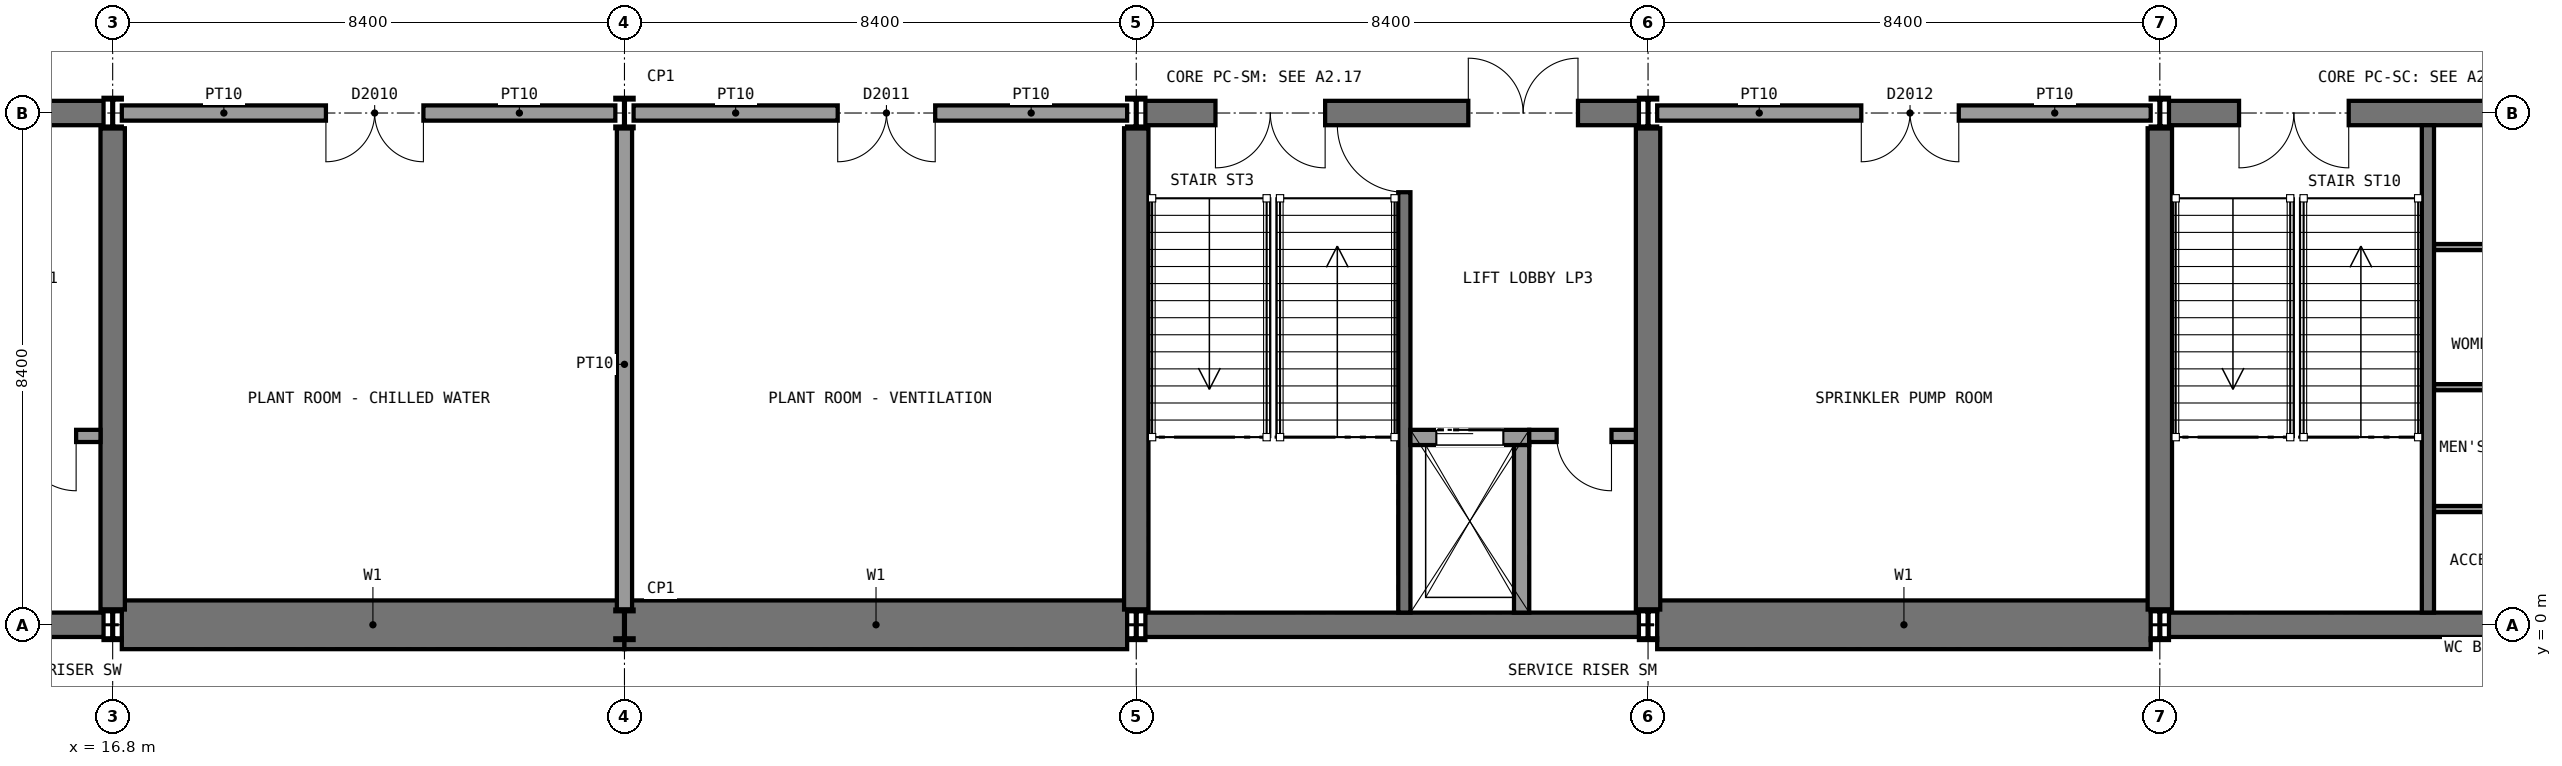
"""IFC4 building model, lengths in metres.
Left out: names, types, materials, properties, quantities, classifications, styles, units other than length and angle.
Written with IfcOpenShell. Run it as: python <this file> out.ifc"""

import sys

from ifc_helpers import new_model, si_unit, direction, frame, frame_2d, origin, origin_2d, place, context, subcontext, project, spatial, rectangle, i_section, extrude, element, fill, save


model = new_model("IFC4")
c1 = context("Model", 3, precision=1e-05, world=origin(), true_north=direction((0.0, 1.0)))
c2 = subcontext(c1, "Body", "Model", "MODEL_VIEW")
j1 = project(units=[si_unit("LENGTHUNIT", "METRE"), si_unit("PLANEANGLEUNIT", "RADIAN")], contexts=[c1])
p1 = place(None, origin())
s1 = spatial("IfcSite", under=j1, at=p1, CompositionType="ELEMENT")
p2 = place(p1, origin())
s2 = spatial("IfcBuilding", under=s1, at=p2, CompositionType="ELEMENT")
p3 = place(p2, frame((0.0, 0.0, -9.9)))
s3 = spatial("IfcBuildingStorey", under=s2, at=p3, CompositionType="ELEMENT", Elevation=-9.9)
p4 = place(p3, frame((16.95, 0.0, 0.0), z_axis=(0.0, 0.0, 1.0), x_axis=(1.0, 0.0, 0.0)))
e1 = element("IfcWall", 1, at=p4, inside=s3, PredefinedType="SOLIDWALL", context=c2, shape_type="SweptSolid", body=[
    extrude(rectangle(XDim=8.25, YDim=0.8, at=frame_2d((4.125, 0.0))), origin(), (0.0, 0.0, 1.0), 4.65),
])
p5 = place(p3, frame((25.2, 0.0, 0.0), z_axis=(0.0, 0.0, 1.0), x_axis=(1.0, 0.0, 0.0)))
e2 = element("IfcWall", 2, at=p5, inside=s3, PredefinedType="SOLIDWALL", context=c2, shape_type="SweptSolid", body=[
    extrude(rectangle(XDim=8.25, YDim=0.8, at=frame_2d((4.125, 0.0))), origin(), (0.0, 0.0, 1.0), 4.65),
])
p6 = place(p3, frame((42.15, 0.0, 0.0), z_axis=(0.0, 0.0, 1.0), x_axis=(1.0, 0.0, 0.0)))
e3 = element("IfcWall", 3, at=p6, inside=s3, PredefinedType="SOLIDWALL", context=c2, shape_type="SweptSolid", body=[
    extrude(rectangle(XDim=8.1, YDim=0.8, at=frame_2d((4.05, 0.0))), origin(), (0.0, 0.0, 1.0), 4.65),
])
p7 = place(p3, frame((8.55, 0.0, 0.0), z_axis=(0.0, 0.0, 1.0), x_axis=(1.0, 0.0, 0.0)))
e4 = element("IfcWall", 4, at=p7, inside=s3, PredefinedType="SHEAR", context=c2, shape_type="SweptSolid", body=[
    extrude(rectangle(XDim=8.1, YDim=0.4, at=frame_2d((4.05, 0.0))), origin(), (0.0, 0.0, 1.0), 4.65),
])
p8 = place(p3, frame((8.55, 8.4, 0.0), z_axis=(0.0, 0.0, 1.0), x_axis=(1.0, 0.0, 0.0)))
e5 = element("IfcWall", 5, at=p8, inside=s3, PredefinedType="SHEAR", context=c2, shape_type="SweptSolid", body=[
    extrude(rectangle(XDim=8.1, YDim=0.4, at=frame_2d((4.05, 0.0))), origin(), (0.0, 0.0, 1.0), 4.65),
])
p9 = place(p8, frame((1.15, 0.0, 0.0)))
e6 = element("IfcOpeningElement", 6, at=p9, cuts=e5, PredefinedType="OPENING", context=c2, shape_type="SweptSolid", body=[
    extrude(rectangle(XDim=1.8, YDim=2.1, at=frame_2d((0.9, 1.05))), frame((0.0, 0.21, 0.0), z_axis=(0.0, -1.0, 0.0), x_axis=(1.0, 0.0, 0.0)), (0.0, 0.0, 1.0), 0.42),
])
p10 = place(p8, frame((5.3, 0.0, 0.0)))
e7 = element("IfcOpeningElement", 7, at=p10, cuts=e5, PredefinedType="OPENING", context=c2, shape_type="SweptSolid", body=[
    extrude(rectangle(XDim=1.8, YDim=2.1, at=frame_2d((0.9, 1.05))), frame((0.0, 0.21, 0.0), z_axis=(0.0, -1.0, 0.0), x_axis=(1.0, 0.0, 0.0)), (0.0, 0.0, 1.0), 0.42),
])
p11 = place(p3, frame((16.8, 0.25, 0.0), z_axis=(0.0, 0.0, 1.0), x_axis=(0.0, 1.0, 0.0)))
e8 = element("IfcWall", 8, at=p11, inside=s3, PredefinedType="SHEAR", context=c2, shape_type="SweptSolid", body=[
    extrude(rectangle(XDim=7.9, YDim=0.4, at=frame_2d((3.95, 0.0))), origin(), (0.0, 0.0, 1.0), 4.65),
])
p12 = place(p3, frame((33.75, 0.0, 0.0), z_axis=(0.0, 0.0, 1.0), x_axis=(1.0, 0.0, 0.0)))
e9 = element("IfcWall", 9, at=p12, inside=s3, PredefinedType="SHEAR", context=c2, shape_type="SweptSolid", body=[
    extrude(rectangle(XDim=8.1, YDim=0.4, at=frame_2d((4.05, 0.0))), origin(), (0.0, 0.0, 1.0), 4.65),
])
p13 = place(p3, frame((33.75, 8.4, 0.0), z_axis=(0.0, 0.0, 1.0), x_axis=(1.0, 0.0, 0.0)))
e10 = element("IfcWall", 10, at=p13, inside=s3, PredefinedType="SHEAR", context=c2, shape_type="SweptSolid", body=[
    extrude(rectangle(XDim=8.1, YDim=0.4, at=frame_2d((4.05, 0.0))), origin(), (0.0, 0.0, 1.0), 4.65),
])
p14 = place(p13, frame((1.15, 0.0, 0.0)))
e11 = element("IfcOpeningElement", 11, at=p14, cuts=e10, PredefinedType="OPENING", context=c2, shape_type="SweptSolid", body=[
    extrude(rectangle(XDim=1.8, YDim=2.1, at=frame_2d((0.9, 1.05))), frame((0.0, 0.21, 0.0), z_axis=(0.0, -1.0, 0.0), x_axis=(1.0, 0.0, 0.0)), (0.0, 0.0, 1.0), 0.42),
])
p15 = place(p13, frame((5.3, 0.0, 0.0)))
e12 = element("IfcOpeningElement", 12, at=p15, cuts=e10, PredefinedType="OPENING", context=c2, shape_type="SweptSolid", body=[
    extrude(rectangle(XDim=1.8, YDim=2.1, at=frame_2d((0.9, 1.05))), frame((0.0, 0.21, 0.0), z_axis=(0.0, -1.0, 0.0), x_axis=(1.0, 0.0, 0.0)), (0.0, 0.0, 1.0), 0.42),
])
for number, where, z_axis, x_axis in (
    (13, (33.6, 0.25, 0.0), (0.0, 0.0, 1.0), (0.0, 1.0, 0.0)),
    (14, (42.0, 0.25, 0.0), (0.0, 0.0, 1.0), (0.0, 1.0, 0.0)),
):
    element("IfcWall", number, at=place(p3, frame(where, z_axis=z_axis, x_axis=x_axis)), inside=s3, PredefinedType="SHEAR", context=c2, shape_type="SweptSolid", body=[
        extrude(rectangle(XDim=7.9, YDim=0.4, at=frame_2d((3.95, 0.0))), origin(), (0.0, 0.0, 1.0), 4.65),
    ])
p16 = place(p3, frame((50.55, 0.0, 0.0), z_axis=(0.0, 0.0, 1.0), x_axis=(1.0, 0.0, 0.0)))
e15 = element("IfcWall", 15, at=p16, inside=s3, PredefinedType="SHEAR", context=c2, shape_type="SweptSolid", body=[
    extrude(rectangle(XDim=8.1, YDim=0.4, at=frame_2d((4.05, 0.0))), origin(), (0.0, 0.0, 1.0), 4.65),
])
p17 = place(p3, frame((50.55, 8.4, 0.0), z_axis=(0.0, 0.0, 1.0), x_axis=(1.0, 0.0, 0.0)))
e16 = element("IfcWall", 16, at=p17, inside=s3, PredefinedType="SHEAR", context=c2, shape_type="SweptSolid", body=[
    extrude(rectangle(XDim=8.1, YDim=0.4, at=frame_2d((4.05, 0.0))), origin(), (0.0, 0.0, 1.0), 4.65),
])
p18 = place(p17, frame((1.15, 0.0, 0.0)))
e17 = element("IfcOpeningElement", 17, at=p18, cuts=e16, PredefinedType="OPENING", context=c2, shape_type="SweptSolid", body=[
    extrude(rectangle(XDim=1.8, YDim=2.1, at=frame_2d((0.9, 1.05))), frame((0.0, 0.21, 0.0), z_axis=(0.0, -1.0, 0.0), x_axis=(1.0, 0.0, 0.0)), (0.0, 0.0, 1.0), 0.42),
])
p19 = place(p17, frame((5.6, 0.0, 0.0)))
e18 = element("IfcOpeningElement", 18, at=p19, cuts=e16, PredefinedType="OPENING", context=c2, shape_type="SweptSolid", body=[
    extrude(rectangle(XDim=1.2, YDim=2.1, at=frame_2d((0.6, 1.05))), frame((0.0, 0.21, 0.0), z_axis=(0.0, -1.0, 0.0), x_axis=(1.0, 0.0, 0.0)), (0.0, 0.0, 1.0), 0.42),
])
p20 = place(p3, frame((50.4, 0.25, 0.0), z_axis=(0.0, 0.0, 1.0), x_axis=(0.0, 1.0, 0.0)))
e19 = element("IfcWall", 19, at=p20, inside=s3, PredefinedType="SHEAR", context=c2, shape_type="SweptSolid", body=[
    extrude(rectangle(XDim=7.9, YDim=0.4, at=frame_2d((3.95, 0.0))), origin(), (0.0, 0.0, 1.0), 4.65),
])
for number, where, z_axis, x_axis in (
    (20, (16.8, 0.0, 0.0), (0.0, 0.0, 1.0), (1.0, 0.0, 0.0)),
    (21, (16.8, 8.4, 0.0), (0.0, 0.0, 1.0), (1.0, 0.0, 0.0)),
    (22, (25.2, 0.0, 0.0), (0.0, 0.0, 1.0), (1.0, 0.0, 0.0)),
    (23, (25.2, 8.4, 0.0), (0.0, 0.0, 1.0), (1.0, 0.0, 0.0)),
    (24, (33.6, 0.0, 0.0), (0.0, 0.0, 1.0), (1.0, 0.0, 0.0)),
    (25, (33.6, 8.4, 0.0), (0.0, 0.0, 1.0), (1.0, 0.0, 0.0)),
    (26, (42.0, 0.0, 0.0), (0.0, 0.0, 1.0), (1.0, 0.0, 0.0)),
    (27, (42.0, 8.4, 0.0), (0.0, 0.0, 1.0), (1.0, 0.0, 0.0)),
    (28, (50.4, 0.0, 0.0), (0.0, 0.0, 1.0), (1.0, 0.0, 0.0)),
    (29, (50.4, 8.4, 0.0), (0.0, 0.0, 1.0), (1.0, 0.0, 0.0)),
):
    element("IfcColumn", number, at=place(p3, frame(where, z_axis=z_axis, x_axis=x_axis)), inside=s3, PredefinedType="COLUMN", context=c2, shape_type="SweptSolid", body=[
        extrude(i_section(OverallWidth=0.3, OverallDepth=0.5, WebThickness=0.014, FlangeThickness=0.028, FilletRadius=0.027, at=origin_2d()), origin(), (0.0, 0.0, 1.0), 5.0),
    ])
p21 = place(p3, frame((54.9, 6.2, 0.0), z_axis=(0.0, 0.0, 1.0), x_axis=(1.0, 0.0, 0.0)))
e30 = element("IfcWall", 30, at=p21, inside=s3, PredefinedType="PARTITIONING", context=c2, shape_type="SweptSolid", body=[
    extrude(rectangle(XDim=2.4, YDim=0.1, at=frame_2d((1.2, 0.0))), origin(), (0.0, 0.0, 1.0), 4.78),
])
p22 = place(p21, frame((0.85, 0.0, 0.0)))
e31 = element("IfcOpeningElement", 31, at=p22, cuts=e30, PredefinedType="OPENING", context=c2, shape_type="SweptSolid", body=[
    extrude(rectangle(XDim=0.9, YDim=2.1, at=frame_2d((0.45, 1.05))), frame((0.0, 0.06, 0.0), z_axis=(0.0, -1.0, 0.0), x_axis=(1.0, 0.0, 0.0)), (0.0, 0.0, 1.0), 0.12),
])
for number, where, z_axis, x_axis in (
    (32, (54.9, 3.9, 0.0), (0.0, 0.0, 1.0), (1.0, 0.0, 0.0)),
    (33, (54.9, 1.9, 0.0), (0.0, 0.0, 1.0), (1.0, 0.0, 0.0)),
):
    element("IfcWall", number, at=place(p3, frame(where, z_axis=z_axis, x_axis=x_axis)), inside=s3, PredefinedType="PARTITIONING", context=c2, shape_type="SweptSolid", body=[
        extrude(rectangle(XDim=2.4, YDim=0.1, at=frame_2d((1.2, 0.0))), origin(), (0.0, 0.0, 1.0), 4.78),
    ])
p23 = place(p3, frame((16.95, 8.4, 0.0), z_axis=(0.0, 0.0, 1.0), x_axis=(1.0, 0.0, 0.0)))
e34 = element("IfcWall", 34, at=p23, inside=s3, PredefinedType="SOLIDWALL", context=c2, shape_type="SweptSolid", body=[
    extrude(rectangle(XDim=8.1, YDim=0.25, at=frame_2d((4.05, 0.0))), origin(), (0.0, 0.0, 1.0), 4.65),
])
p24 = place(p23, frame((3.35, 0.0, 0.0)))
e35 = element("IfcOpeningElement", 35, at=p24, cuts=e34, PredefinedType="OPENING", context=c2, shape_type="SweptSolid", body=[
    extrude(rectangle(XDim=1.6, YDim=2.2, at=frame_2d((0.8, 1.1))), frame((0.0, 0.135, 0.0), z_axis=(0.0, -1.0, 0.0), x_axis=(1.0, 0.0, 0.0)), (0.0, 0.0, 1.0), 0.27),
])
p25 = place(p3, frame((25.35, 8.4, 0.0), z_axis=(0.0, 0.0, 1.0), x_axis=(1.0, 0.0, 0.0)))
e36 = element("IfcWall", 36, at=p25, inside=s3, PredefinedType="SOLIDWALL", context=c2, shape_type="SweptSolid", body=[
    extrude(rectangle(XDim=8.1, YDim=0.25, at=frame_2d((4.05, 0.0))), origin(), (0.0, 0.0, 1.0), 4.65),
])
p26 = place(p25, frame((3.35, 0.0, 0.0)))
e37 = element("IfcOpeningElement", 37, at=p26, cuts=e36, PredefinedType="OPENING", context=c2, shape_type="SweptSolid", body=[
    extrude(rectangle(XDim=1.6, YDim=2.2, at=frame_2d((0.8, 1.1))), frame((0.0, 0.135, 0.0), z_axis=(0.0, -1.0, 0.0), x_axis=(1.0, 0.0, 0.0)), (0.0, 0.0, 1.0), 0.27),
])
p27 = place(p3, frame((42.15, 8.4, 0.0), z_axis=(0.0, 0.0, 1.0), x_axis=(1.0, 0.0, 0.0)))
e38 = element("IfcWall", 38, at=p27, inside=s3, PredefinedType="SOLIDWALL", context=c2, shape_type="SweptSolid", body=[
    extrude(rectangle(XDim=8.1, YDim=0.25, at=frame_2d((4.05, 0.0))), origin(), (0.0, 0.0, 1.0), 4.65),
])
p28 = place(p27, frame((3.35, 0.0, 0.0)))
e39 = element("IfcOpeningElement", 39, at=p28, cuts=e38, PredefinedType="OPENING", context=c2, shape_type="SweptSolid", body=[
    extrude(rectangle(XDim=1.6, YDim=2.2, at=frame_2d((0.8, 1.1))), frame((0.0, 0.135, 0.0), z_axis=(0.0, -1.0, 0.0), x_axis=(1.0, 0.0, 0.0)), (0.0, 0.0, 1.0), 0.27),
])
p29 = place(p3, frame((25.2, 0.25, 0.0), z_axis=(0.0, 0.0, 1.0), x_axis=(0.0, 1.0, 0.0)))
e40 = element("IfcWall", 40, at=p29, inside=s3, PredefinedType="SOLIDWALL", context=c2, shape_type="SweptSolid", body=[
    extrude(rectangle(XDim=7.9, YDim=0.25, at=frame_2d((3.95, 0.0))), origin(), (0.0, 0.0, 1.0), 4.65),
])
p30 = place(p3, frame((14.85, 3.1, 0.0), z_axis=(0.0, 0.0, 1.0), x_axis=(1.0, 0.0, 0.0)))
e41 = element("IfcWall", 41, at=p30, inside=s3, PredefinedType="PARTITIONING", context=c2, shape_type="SweptSolid", body=[
    extrude(rectangle(XDim=1.75, YDim=0.2, at=frame_2d((0.875, 0.0))), origin(), (0.0, 0.0, 1.0), 4.65),
])
p31 = place(p30, frame((0.45, 0.0, 0.0)))
e42 = element("IfcOpeningElement", 42, at=p31, cuts=e41, PredefinedType="OPENING", context=c2, shape_type="SweptSolid", body=[
    extrude(rectangle(XDim=0.9, YDim=2.1, at=frame_2d((0.45, 1.05))), frame((0.0, 0.11, 0.0), z_axis=(0.0, -1.0, 0.0), x_axis=(1.0, 0.0, 0.0)), (0.0, 0.0, 1.0), 0.22),
])
p32 = place(p3, frame((38.0, 0.2, 0.0), z_axis=(0.0, 0.0, 1.0), x_axis=(0.0, 1.0, 0.0)))
e43 = element("IfcWall", 43, at=p32, inside=s3, PredefinedType="SHEAR", context=c2, shape_type="SweptSolid", body=[
    extrude(rectangle(XDim=8.0, YDim=0.2, at=frame_2d((4.0, 0.0))), origin(), (0.0, 0.0, 1.0), 4.65),
])
p33 = place(p32, frame((6.9, 0.0, 0.0)))
e44 = element("IfcOpeningElement", 44, at=p33, cuts=e43, PredefinedType="OPENING", context=c2, shape_type="SweptSolid", body=[
    extrude(rectangle(XDim=1.11, YDim=2.1, at=frame_2d((0.555, 1.05))), frame((0.0, 0.11, 0.0), z_axis=(0.0, -1.0, 0.0), x_axis=(1.0, 0.0, 0.0)), (0.0, 0.0, 1.0), 0.22),
])
p34 = place(p3, frame((38.1, 3.075, -1.4), z_axis=(0.0, 0.0, 1.0), x_axis=(1.0, 0.0, 0.0)))
e45 = element("IfcWall", 45, at=p34, inside=s3, PredefinedType="SOLIDWALL", context=c2, shape_type="SweptSolid", body=[
    extrude(rectangle(XDim=1.95, YDim=0.25, at=frame_2d((0.975, 0.0))), origin(), (0.0, 0.0, 1.0), 6.4),
])
p35 = place(p34, frame((0.425, 0.0, 1.4)))
e46 = element("IfcOpeningElement", 46, at=p35, cuts=e45, PredefinedType="OPENING", context=c2, shape_type="SweptSolid", body=[
    extrude(rectangle(XDim=1.1, YDim=2.1, at=frame_2d((0.55, 1.05))), frame((0.0, 0.135, 0.0), z_axis=(0.0, -1.0, 0.0), x_axis=(1.0, 0.0, 0.0)), (0.0, 0.0, 1.0), 0.27),
])
p36 = place(p3, frame((39.925, 0.2, -1.4), z_axis=(0.0, 0.0, 1.0), x_axis=(0.0, 1.0, 0.0)))
e47 = element("IfcWall", 47, at=p36, inside=s3, PredefinedType="SOLIDWALL", context=c2, shape_type="SweptSolid", body=[
    extrude(rectangle(XDim=2.75, YDim=0.25, at=frame_2d((1.375, 0.0))), origin(), (0.0, 0.0, 1.0), 6.4),
])
p37 = place(p3, frame((40.05, 3.1, 0.0), z_axis=(0.0, 0.0, 1.0), x_axis=(1.0, 0.0, 0.0)))
e48 = element("IfcWall", 48, at=p37, inside=s3, PredefinedType="PARTITIONING", context=c2, shape_type="SweptSolid", body=[
    extrude(rectangle(XDim=1.75, YDim=0.2, at=frame_2d((0.875, 0.0))), origin(), (0.0, 0.0, 1.0), 4.65),
])
p38 = place(p37, frame((0.45, 0.0, 0.0)))
e49 = element("IfcOpeningElement", 49, at=p38, cuts=e48, PredefinedType="OPENING", context=c2, shape_type="SweptSolid", body=[
    extrude(rectangle(XDim=0.9, YDim=2.1, at=frame_2d((0.45, 1.05))), frame((0.0, 0.11, 0.0), z_axis=(0.0, -1.0, 0.0), x_axis=(1.0, 0.0, 0.0)), (0.0, 0.0, 1.0), 0.22),
])
p39 = place(p3, frame((54.8, 0.2, 0.0), z_axis=(0.0, 0.0, 1.0), x_axis=(0.0, 1.0, 0.0)))
e50 = element("IfcWall", 50, at=p39, inside=s3, PredefinedType="SHEAR", context=c2, shape_type="SweptSolid", body=[
    extrude(rectangle(XDim=8.0, YDim=0.2, at=frame_2d((4.0, 0.0))), origin(), (0.0, 0.0, 1.0), 4.65),
])
p40 = place(p24, frame((1.6, 0.0, 0.0), z_axis=(0.0, 0.0, 1.0), x_axis=(-1.0, 0.0, 0.0)))
e51 = element("IfcDoor", 51, at=p40, inside=s3, OperationType="DOUBLE_DOOR_SINGLE_SWING", PredefinedType="DOOR", context=c2, shape_type="SweptSolid", body=[
    extrude(rectangle(XDim=1.6, YDim=2.2, at=frame_2d((0.8, 1.1))), frame((0.0, 0.025, 0.0), z_axis=(0.0, -1.0, 0.0), x_axis=(1.0, 0.0, 0.0)), (0.0, 0.0, 1.0), 0.05),
])
fill(e35, e51)
p41 = place(p26, frame((1.6, 0.0, 0.0), z_axis=(0.0, 0.0, 1.0), x_axis=(-1.0, 0.0, 0.0)))
e52 = element("IfcDoor", 52, at=p41, inside=s3, OperationType="DOUBLE_DOOR_SINGLE_SWING", PredefinedType="DOOR", context=c2, shape_type="SweptSolid", body=[
    extrude(rectangle(XDim=1.6, YDim=2.2, at=frame_2d((0.8, 1.1))), frame((0.0, 0.025, 0.0), z_axis=(0.0, -1.0, 0.0), x_axis=(1.0, 0.0, 0.0)), (0.0, 0.0, 1.0), 0.05),
])
fill(e37, e52)
p42 = place(p28, frame((1.6, 0.0, 0.0), z_axis=(0.0, 0.0, 1.0), x_axis=(-1.0, 0.0, 0.0)))
e53 = element("IfcDoor", 53, at=p42, inside=s3, OperationType="DOUBLE_DOOR_SINGLE_SWING", PredefinedType="DOOR", context=c2, shape_type="SweptSolid", body=[
    extrude(rectangle(XDim=1.6, YDim=2.2, at=frame_2d((0.8, 1.1))), frame((0.0, 0.025, 0.0), z_axis=(0.0, -1.0, 0.0), x_axis=(1.0, 0.0, 0.0)), (0.0, 0.0, 1.0), 0.05),
])
fill(e39, e53)
p43 = place(p31, frame((0.9, 0.0, 0.0), z_axis=(0.0, 0.0, 1.0), x_axis=(-1.0, 0.0, 0.0)))
e54 = element("IfcDoor", 54, at=p43, inside=s3, OperationType="SINGLE_SWING_LEFT", PredefinedType="DOOR", context=c2, shape_type="SweptSolid", body=[
    extrude(rectangle(XDim=0.9, YDim=2.1, at=frame_2d((0.45, 1.05))), frame((0.0, 0.025, 0.0), z_axis=(0.0, -1.0, 0.0), x_axis=(1.0, 0.0, 0.0)), (0.0, 0.0, 1.0), 0.05),
])
fill(e42, e54)
p44 = place(p33, origin())
e55 = element("IfcDoor", 55, at=p44, inside=s3, OperationType="SINGLE_SWING_RIGHT", PredefinedType="DOOR", context=c2, shape_type="SweptSolid", body=[
    extrude(rectangle(XDim=1.1, YDim=2.1, at=frame_2d((0.55, 1.05))), frame((0.0, 0.025, 0.0), z_axis=(0.0, -1.0, 0.0), x_axis=(1.0, 0.0, 0.0)), (0.0, 0.0, 1.0), 0.05),
])
fill(e44, e55)
p45 = place(p35, origin())
e56 = element("IfcDoor", 56, at=p45, inside=s3, OperationType="SLIDING_TO_LEFT", PredefinedType="DOOR", context=c2, shape_type="SweptSolid", body=[
    extrude(rectangle(XDim=1.1, YDim=2.1, at=frame_2d((0.55, 1.05))), frame((0.0, 0.025, 0.0), z_axis=(0.0, -1.0, 0.0), x_axis=(1.0, 0.0, 0.0)), (0.0, 0.0, 1.0), 0.05),
])
fill(e46, e56)
p46 = place(p38, frame((0.9, 0.0, 0.0), z_axis=(0.0, 0.0, 1.0), x_axis=(-1.0, 0.0, 0.0)))
e57 = element("IfcDoor", 57, at=p46, inside=s3, OperationType="SINGLE_SWING_LEFT", PredefinedType="DOOR", context=c2, shape_type="SweptSolid", body=[
    extrude(rectangle(XDim=0.9, YDim=2.1, at=frame_2d((0.45, 1.05))), frame((0.0, 0.025, 0.0), z_axis=(0.0, -1.0, 0.0), x_axis=(1.0, 0.0, 0.0)), (0.0, 0.0, 1.0), 0.05),
])
fill(e49, e57)
p47 = place(p14, frame((1.8, 0.0, 0.0), z_axis=(0.0, 0.0, 1.0), x_axis=(-1.0, 0.0, 0.0)))
e58 = element("IfcDoor", 58, at=p47, inside=s3, OperationType="DOUBLE_DOOR_SINGLE_SWING", PredefinedType="DOOR", context=c2, shape_type="SweptSolid", body=[
    extrude(rectangle(XDim=1.8, YDim=2.1, at=frame_2d((0.9, 1.05))), frame((0.0, 0.025, 0.0), z_axis=(0.0, -1.0, 0.0), x_axis=(1.0, 0.0, 0.0)), (0.0, 0.0, 1.0), 0.05),
])
fill(e11, e58)
p48 = place(p15, origin())
e59 = element("IfcDoor", 59, at=p48, inside=s3, OperationType="DOUBLE_DOOR_SINGLE_SWING", PredefinedType="DOOR", context=c2, shape_type="SweptSolid", body=[
    extrude(rectangle(XDim=1.8, YDim=2.1, at=frame_2d((0.9, 1.05))), frame((0.0, 0.025, 0.0), z_axis=(0.0, -1.0, 0.0), x_axis=(1.0, 0.0, 0.0)), (0.0, 0.0, 1.0), 0.05),
])
fill(e12, e59)
p49 = place(p18, frame((1.8, 0.0, 0.0), z_axis=(0.0, 0.0, 1.0), x_axis=(-1.0, 0.0, 0.0)))
e60 = element("IfcDoor", 60, at=p49, inside=s3, OperationType="DOUBLE_DOOR_SINGLE_SWING", PredefinedType="DOOR", context=c2, shape_type="SweptSolid", body=[
    extrude(rectangle(XDim=1.8, YDim=2.1, at=frame_2d((0.9, 1.05))), frame((0.0, 0.025, 0.0), z_axis=(0.0, -1.0, 0.0), x_axis=(1.0, 0.0, 0.0)), (0.0, 0.0, 1.0), 0.05),
])
fill(e17, e60)
save(model, sys.argv[1])
